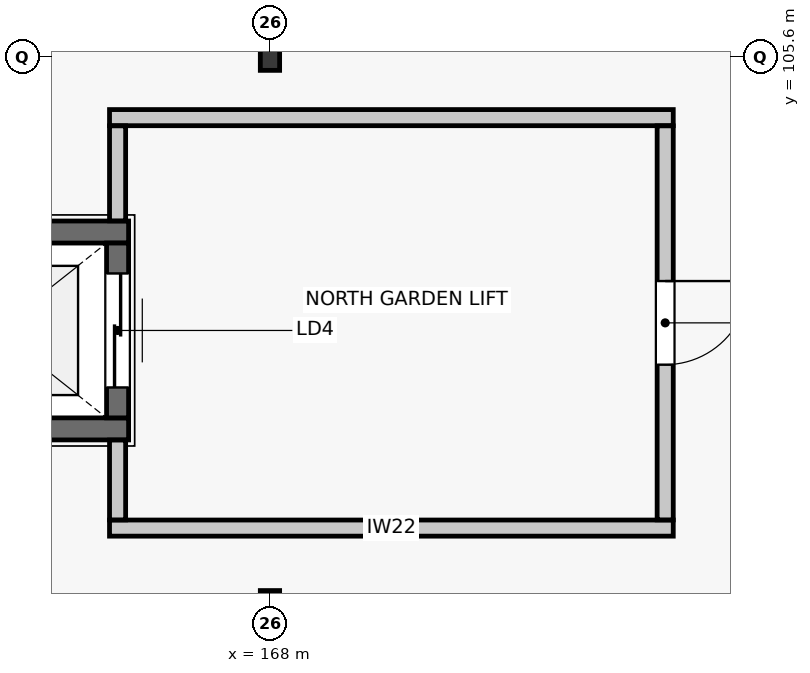
"""IFC4 building model, lengths in metres.
Left out: names, types, materials, properties, quantities, classifications, styles, units other than length and angle.
Written with IfcOpenShell. Run it as: python <this file> out.ifc"""

import sys

from ifc_helpers import new_model, si_unit, direction, frame, frame_2d, origin, origin_2d, place, context, subcontext, project, spatial, rectangle, i_section, extrude, element, fill, save


model = new_model("IFC4")
c1 = context("Model", 3, precision=1e-05, world=origin(), true_north=direction((0.0, 1.0)))
c2 = subcontext(c1, "Body", "Model", "MODEL_VIEW")
j1 = project(units=[si_unit("LENGTHUNIT", "METRE"), si_unit("PLANEANGLEUNIT", "RADIAN")], contexts=[c1])
p1 = place(None, origin())
s1 = spatial("IfcSite", under=j1, at=p1, CompositionType="ELEMENT")
p2 = place(p1, origin())
s2 = spatial("IfcBuilding", under=s1, at=p2, CompositionType="ELEMENT")
p3 = place(p2, frame((0.0, 0.0, 13.2)))
s3 = spatial("IfcBuildingStorey", under=s2, at=p3, CompositionType="ELEMENT", Elevation=13.2)
for number, where, z_axis, x_axis in (
    (1, (168.0, 98.4, 0.0), (0.0, 0.0, 1.0), (1.0, 0.0, 0.0)),
    (2, (168.0, 105.6, 0.0), (0.0, 0.0, 1.0), (1.0, 0.0, 0.0)),
):
    element("IfcColumn", number, at=place(p3, frame(where, z_axis=z_axis, x_axis=x_axis)), inside=s3, PredefinedType="COLUMN", context=c2, shape_type="SweptSolid", body=[
        extrude(i_section(OverallWidth=0.254, OverallDepth=0.356, WebThickness=0.01, FlangeThickness=0.018, FilletRadius=0.015, at=origin_2d()), origin(), (0.0, 0.0, 1.0), 3.66),
    ])
for number, where, z_axis, x_axis in (
    (3, (166.14, 100.705, 0.0), (0.0, 0.0, 1.0), (-1.0, 0.0, 0.0)),
    (4, (162.66, 103.295, 0.0), (0.0, 0.0, 1.0), (1.0, 0.0, 0.0)),
):
    element("IfcWall", number, at=place(p3, frame(where, z_axis=z_axis, x_axis=x_axis)), inside=s3, PredefinedType="SHEAR", context=c2, shape_type="SweptSolid", body=[
        extrude(rectangle(XDim=3.48, YDim=0.29, at=frame_2d((1.74, 0.0))), origin(), (0.0, 0.0, 1.0), 3.4),
    ])
p4 = place(p3, frame((165.995, 103.15, 0.0), z_axis=(0.0, 0.0, 1.0), x_axis=(0.0, -1.0, 0.0)))
e5 = element("IfcWall", 5, at=p4, inside=s3, PredefinedType="SHEAR", context=c2, shape_type="SweptSolid", body=[
    extrude(rectangle(XDim=2.3, YDim=0.29, at=frame_2d((1.15, 0.0))), origin(), (0.0, 0.0, 1.0), 3.4),
])
p5 = place(p4, frame((0.4, 0.0, 0.0)))
e6 = element("IfcOpeningElement", 6, at=p5, cuts=e5, PredefinedType="OPENING", context=c2, shape_type="SweptSolid", body=[
    extrude(rectangle(XDim=1.5, YDim=2.3, at=frame_2d((0.75, 1.15))), frame((0.0, 0.155, 0.0), z_axis=(0.0, -1.0, 0.0), x_axis=(1.0, 0.0, 0.0)), (0.0, 0.0, 1.0), 0.31),
])
for number, where, z_axis, x_axis in (
    (7, (173.306, 99.4, 0.0), (0.0, 0.0, 1.0), (-1.0, 0.0, 0.0)),
    (8, (165.889, 104.8, 0.0), (0.0, 0.0, 1.0), (1.0, 0.0, 0.0)),
):
    element("IfcWall", number, at=place(p3, frame(where, z_axis=z_axis, x_axis=x_axis)), inside=s3, PredefinedType="PARTITIONING", context=c2, shape_type="SweptSolid", body=[
        extrude(rectangle(XDim=7.417, YDim=0.212, at=frame_2d((3.708, 0.0))), origin(), (0.0, 0.0, 1.0), 3.13),
    ])
p6 = place(p3, frame((165.995, 99.508, 0.0), z_axis=(0.0, 0.0, 1.0), x_axis=(0.0, 1.0, 0.0)))
e9 = element("IfcWall", 9, at=p6, inside=s3, PredefinedType="PARTITIONING", context=c2, shape_type="SweptSolid", body=[
    extrude(rectangle(XDim=1.05, YDim=0.212, at=frame_2d((0.525, 0.0))), origin(), (0.0, 0.0, 1.0), 3.13),
])
p7 = place(p3, frame((165.995, 103.442, 0.0), z_axis=(0.0, 0.0, 1.0), x_axis=(0.0, 1.0, 0.0)))
e10 = element("IfcWall", 10, at=p7, inside=s3, PredefinedType="PARTITIONING", context=c2, shape_type="SweptSolid", body=[
    extrude(rectangle(XDim=1.25, YDim=0.212, at=frame_2d((0.625, 0.0))), origin(), (0.0, 0.0, 1.0), 3.13),
])
p8 = place(p3, frame((173.2, 104.692, 0.0), z_axis=(0.0, 0.0, 1.0), x_axis=(0.0, -1.0, 0.0)))
e11 = element("IfcWall", 11, at=p8, inside=s3, PredefinedType="PARTITIONING", context=c2, shape_type="SweptSolid", body=[
    extrude(rectangle(XDim=5.184, YDim=0.212, at=frame_2d((2.592, 0.0))), origin(), (0.0, 0.0, 1.0), 3.13),
])
p9 = place(p8, frame((2.042, 0.0, 0.0)))
e12 = element("IfcOpeningElement", 12, at=p9, cuts=e11, PredefinedType="OPENING", context=c2, shape_type="SweptSolid", body=[
    extrude(rectangle(XDim=1.1, YDim=2.1, at=frame_2d((0.55, 1.05))), frame((0.0, 0.116, 0.0), z_axis=(0.0, -1.0, 0.0), x_axis=(1.0, 0.0, 0.0)), (0.0, 0.0, 1.0), 0.232),
])
p10 = place(p5, origin())
e13 = element("IfcDoor", 13, at=p10, inside=s3, OperationType="DOUBLE_DOOR_SLIDING", PredefinedType="DOOR", context=c2, shape_type="SweptSolid", body=[
    extrude(rectangle(XDim=1.5, YDim=2.3, at=frame_2d((0.75, 1.15))), frame((0.0, 0.025, 0.0), z_axis=(0.0, -1.0, 0.0), x_axis=(1.0, 0.0, 0.0)), (0.0, 0.0, 1.0), 0.05),
])
fill(e6, e13)
p11 = place(p9, origin())
e14 = element("IfcDoor", 14, at=p11, inside=s3, OperationType="SINGLE_SWING_LEFT", PredefinedType="DOOR", context=c2, shape_type="SweptSolid", body=[
    extrude(rectangle(XDim=1.1, YDim=2.1, at=frame_2d((0.55, 1.05))), frame((0.0, 0.025, 0.0), z_axis=(0.0, -1.0, 0.0), x_axis=(1.0, 0.0, 0.0)), (0.0, 0.0, 1.0), 0.05),
])
fill(e12, e14)
save(model, sys.argv[1])
